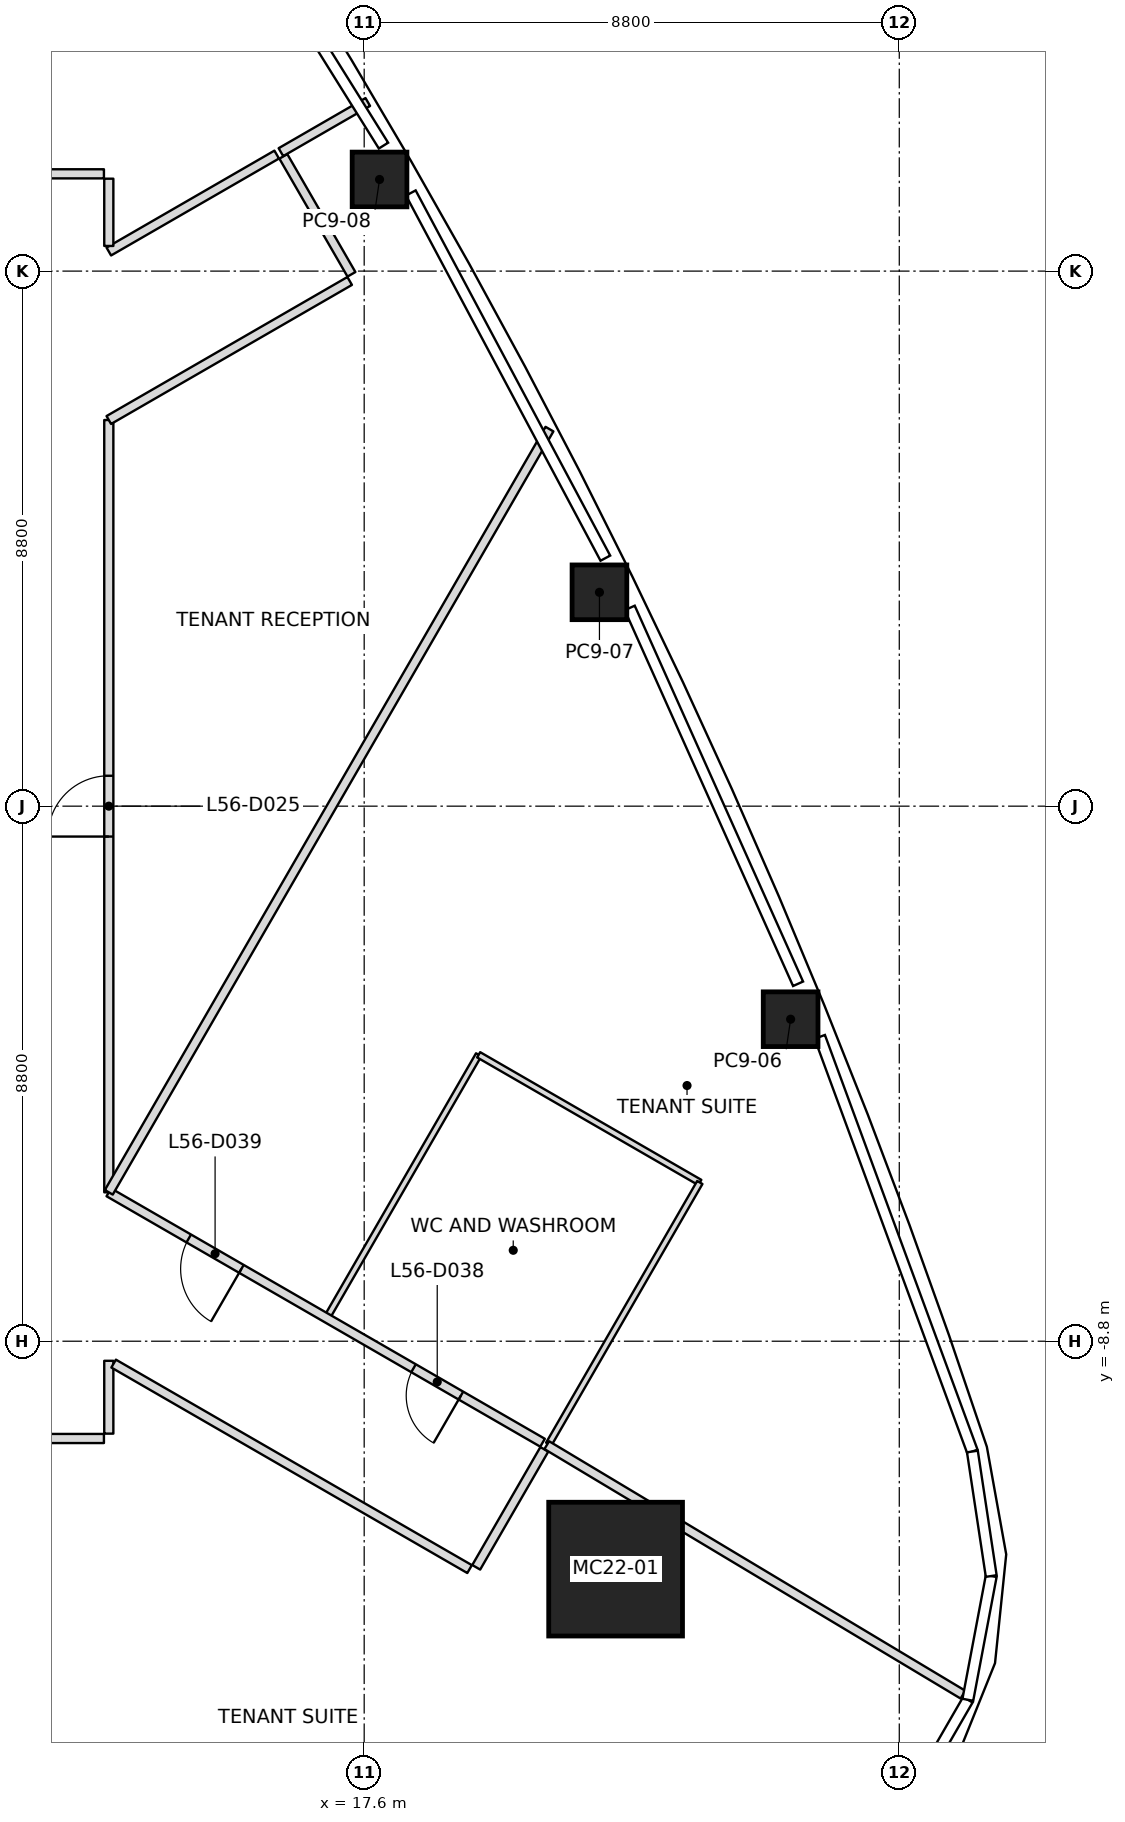
"""IFC4 building model, lengths in metres.
Left out: names, types, materials, properties, quantities, classifications, styles, units other than length and angle.
Written with IfcOpenShell. Run it as: python <this file> out.ifc"""

import sys

from ifc_helpers import new_model, si_unit, direction, frame, frame_2d, origin, origin_2d, place, context, subcontext, project, spatial, rectangle, extrude, element, fill, save


model = new_model("IFC4")
c1 = context("Model", 3, precision=1e-05, world=origin(), true_north=direction((0.0, 1.0)))
c2 = subcontext(c1, "Body", "Model", "MODEL_VIEW")
j1 = project(units=[si_unit("LENGTHUNIT", "METRE"), si_unit("PLANEANGLEUNIT", "RADIAN")], contexts=[c1])
p1 = place(None, origin())
s1 = spatial("IfcSite", under=j1, at=p1, CompositionType="ELEMENT")
p2 = place(p1, origin())
s2 = spatial("IfcBuilding", under=s1, at=p2, CompositionType="ELEMENT")
p3 = place(p2, frame((0.0, 0.0, 251.0)))
s3 = spatial("IfcBuildingStorey", under=s2, at=p3, CompositionType="ELEMENT", Elevation=251.0)
p4 = place(p3, frame((21.735, -12.549, 0.0), z_axis=(-0.027817649629, 0.016104955049, 0.999483270892), x_axis=(0.999613014306, 0.000448175434, 0.027814039075)))
e1 = element("IfcColumn", 1, at=p4, inside=s3, PredefinedType="COLUMN", context=c2, shape_type="SweptSolid", body=[
    extrude(rectangle(XDim=2.2, YDim=2.2, at=origin_2d()), origin(), (0.0, 0.0, 1.0), 4.002),
])
p5 = place(p3, frame((24.613, -3.504, 0.0), z_axis=(-0.017757551143, 0.009946669541, 0.999792845115), x_axis=(-0.377201101393, 0.925994674121, -0.015912027123)))
e2 = element("IfcColumn", 2, at=p5, inside=s3, PredefinedType="COLUMN", context=c2, shape_type="SweptSolid", body=[
    extrude(rectangle(XDim=0.9, YDim=0.9, at=origin_2d()), origin(), (0.0, 0.0, 1.0), 4.001),
])
p6 = place(p3, frame((21.469, 3.517, 0.0), z_axis=(-0.014036674448, 0.002013957638, 0.999899452818), x_axis=(-0.439615277351, 0.898150723159, -0.007980376444)))
e3 = element("IfcColumn", 3, at=p6, inside=s3, PredefinedType="COLUMN", context=c2, shape_type="SweptSolid", body=[
    extrude(rectangle(XDim=0.9, YDim=0.9, at=origin_2d()), origin(), (0.0, 0.0, 1.0), 4.0),
])
p7 = place(p3, frame((17.853, 10.307, 0.0), z_axis=(-0.009887049298, -0.00573692984, 0.999934664812), x_axis=(-0.499975560967, 0.866039512843, 2.5126546e-05)))
e4 = element("IfcColumn", 4, at=p7, inside=s3, PredefinedType="COLUMN", context=c2, shape_type="SweptSolid", body=[
    extrude(rectangle(XDim=0.9, YDim=0.9, at=origin_2d()), origin(), (0.0, 0.0, 1.0), 4.0),
])
p8 = place(p3, frame((20.647, 6.201, 0.0), z_axis=(0.0, 0.0, 1.0), x_axis=(-0.500014063744, -0.866017283926, 0.0)))
e5 = element("IfcWall", 5, at=p8, inside=s3, PredefinedType="PARTITIONING", context=c2, shape_type="SweptSolid", body=[
    extrude(rectangle(XDim=14.494, YDim=0.15, at=frame_2d((7.247, 0.0))), origin(), (0.0, 0.0, 1.0), 3.234),
])
p9 = place(p3, frame((16.231, 10.756, 0.0), z_axis=(0.0, 0.0, 1.0), x_axis=(0.865966208357, 0.500102515474, 0.0)))
e6 = element("IfcWall", 6, at=p9, inside=s3, PredefinedType="PARTITIONING", context=c2, shape_type="SweptSolid", body=[
    extrude(rectangle(XDim=1.65, YDim=0.15, at=frame_2d((0.825, 0.0))), origin(), (0.0, 0.0, 1.0), 3.234),
])
p10 = place(p3, frame((20.603, -10.509, 0.0), z_axis=(0.0, 0.0, 1.0), x_axis=(0.85768451088, -0.514176311976, 0.0)))
e7 = element("IfcWall", 7, at=p10, inside=s3, PredefinedType="PARTITIONING", context=c2, shape_type="SweptSolid", body=[
    extrude(rectangle(XDim=7.981, YDim=0.15, at=frame_2d((3.99, 0.0))), origin(), (0.0, 0.0, 1.0), 3.234),
])
p11 = place(p3, frame((1.2, -10.4, 0.0), z_axis=(0.0, 0.0, 1.0), x_axis=(1.0, 0.0, 0.0)))
e8 = element("IfcWall", 8, at=p11, inside=s3, PredefinedType="PARTITIONING", context=c2, shape_type="SweptSolid", body=[
    extrude(rectangle(XDim=12.12, YDim=0.15, at=frame_2d((6.06, 0.0))), origin(), (0.0, 0.0, 1.0), 3.317),
])
p12 = place(p11, frame((1.65, 0.0, 0.0)))
e9 = element("IfcOpeningElement", 9, at=p12, cuts=e8, PredefinedType="OPENING", context=c2, shape_type="SweptSolid", body=[
    extrude(rectangle(XDim=0.9, YDim=2.1, at=frame_2d((0.45, 1.05))), frame((0.0, 0.075, 0.0), z_axis=(0.0, -1.0, 0.0), x_axis=(1.0, 0.0, 0.0)), (0.0, 0.0, 1.0), 0.15),
])
p13 = place(p11, frame((7.75, 0.0, 0.0)))
e10 = element("IfcOpeningElement", 10, at=p13, cuts=e8, PredefinedType="OPENING", context=c2, shape_type="SweptSolid", body=[
    extrude(rectangle(XDim=1.0, YDim=2.1, at=frame_2d((0.5, 1.05))), frame((0.0, 0.075, 0.0), z_axis=(0.0, -1.0, 0.0), x_axis=(1.0, 0.0, 0.0)), (0.0, 0.0, 1.0), 0.15),
])
p14 = place(p3, frame((13.32, 10.4, 0.0), z_axis=(0.0, 0.0, 1.0), x_axis=(-1.0, 0.0, 0.0)))
e11 = element("IfcWall", 11, at=p14, inside=s3, PredefinedType="PARTITIONING", context=c2, shape_type="SweptSolid", body=[
    extrude(rectangle(XDim=4.12, YDim=0.15, at=frame_2d((2.06, 0.0))), origin(), (0.0, 0.0, 1.0), 3.45),
])
p15 = place(p14, frame((1.52, 0.0, 0.0)))
e12 = element("IfcOpeningElement", 12, at=p15, cuts=e11, PredefinedType="OPENING", context=c2, shape_type="SweptSolid", body=[
    extrude(rectangle(XDim=1.0, YDim=2.1, at=frame_2d((0.5, 1.05))), frame((0.0, 0.075, 0.0), z_axis=(0.0, -1.0, 0.0), x_axis=(1.0, 0.0, 0.0)), (0.0, 0.0, 1.0), 0.15),
])
p16 = place(p3, frame((13.4, -10.32, 0.0), z_axis=(0.0, 0.0, 1.0), x_axis=(0.0, 1.0, 0.0)))
e13 = element("IfcWall", 13, at=p16, inside=s3, PredefinedType="PARTITIONING", context=c2, shape_type="SweptSolid", body=[
    extrude(rectangle(XDim=1.198, YDim=0.15, at=frame_2d((0.599, 0.0))), origin(), (0.0, 0.0, 1.0), 3.233),
])
p17 = place(p3, frame((13.479, -9.168, 0.0), z_axis=(0.0, 0.0, 1.0), x_axis=(0.866036425609, -0.499980909154, 0.0)))
e14 = element("IfcWall", 14, at=p17, inside=s3, PredefinedType="PARTITIONING", context=c2, shape_type="SweptSolid", body=[
    extrude(rectangle(XDim=6.76, YDim=0.15, at=frame_2d((3.38, 0.0))), origin(), (0.0, 0.0, 1.0), 3.233),
])
p18 = place(p3, frame((13.4, -6.351, 0.0), z_axis=(0.0, 0.0, 1.0), x_axis=(0.0, 1.0, 0.0)))
e15 = element("IfcWall", 15, at=p18, inside=s3, PredefinedType="PARTITIONING", context=c2, shape_type="SweptSolid", body=[
    extrude(rectangle(XDim=12.702, YDim=0.15, at=frame_2d((6.351, 0.0))), origin(), (0.0, 0.0, 1.0), 3.317),
])
p19 = place(p18, frame((5.851, 0.0, 0.0)))
e16 = element("IfcOpeningElement", 16, at=p19, cuts=e15, PredefinedType="OPENING", context=c2, shape_type="SweptSolid", body=[
    extrude(rectangle(XDim=1.0, YDim=2.1, at=frame_2d((0.5, 1.05))), frame((0.0, 0.075, 0.0), z_axis=(0.0, -1.0, 0.0), x_axis=(1.0, 0.0, 0.0)), (0.0, 0.0, 1.0), 0.15),
])
p20 = place(p3, frame((13.4, 6.351, 0.0), z_axis=(0.0, 0.0, 1.0), x_axis=(0.866027379035, 0.49999657875, 0.0)))
e17 = element("IfcWall", 17, at=p20, inside=s3, PredefinedType="PARTITIONING", context=c2, shape_type="SweptSolid", body=[
    extrude(rectangle(XDim=4.574, YDim=0.15, at=frame_2d((2.287, 0.0))), origin(), (0.0, 0.0, 1.0), 3.45),
])
p21 = place(p3, frame((20.533, -10.469, 0.0), z_axis=(0.0, 0.0, 1.0), x_axis=(-0.866025662596, 0.499999551726, 0.0)))
e18 = element("IfcWall", 18, at=p21, inside=s3, PredefinedType="PARTITIONING", context=c2, shape_type="SweptSolid", body=[
    extrude(rectangle(XDim=8.237, YDim=0.15, at=frame_2d((4.118, 0.0))), origin(), (0.0, 0.0, 1.0), 3.317),
])
p22 = place(p21, frame((1.55, 0.0, 0.0)))
e19 = element("IfcOpeningElement", 19, at=p22, cuts=e18, PredefinedType="OPENING", context=c2, shape_type="SweptSolid", body=[
    extrude(rectangle(XDim=0.9, YDim=2.1, at=frame_2d((0.45, 1.05))), frame((0.0, 0.075, 0.0), z_axis=(0.0, -1.0, 0.0), x_axis=(1.0, 0.0, 0.0)), (0.0, 0.0, 1.0), 0.15),
])
p23 = place(p21, frame((5.719, 0.0, 0.0)))
e20 = element("IfcOpeningElement", 20, at=p23, cuts=e18, PredefinedType="OPENING", context=c2, shape_type="SweptSolid", body=[
    extrude(rectangle(XDim=1.0, YDim=2.1, at=frame_2d((0.5, 1.05))), frame((0.0, 0.075, 0.0), z_axis=(0.0, -1.0, 0.0), x_axis=(1.0, 0.0, 0.0)), (0.0, 0.0, 1.0), 0.15),
])
p24 = place(p3, frame((16.161, 10.716, 0.0), z_axis=(0.0, 0.0, 1.0), x_axis=(-0.86603896, -0.499976519211, 0.0)))
e21 = element("IfcWall", 21, at=p24, inside=s3, PredefinedType="PARTITIONING", context=c2, shape_type="SweptSolid", body=[
    extrude(rectangle(XDim=3.189, YDim=0.15, at=frame_2d((1.594, 0.0))), origin(), (0.0, 0.0, 1.0), 3.45),
])
p25 = place(p3, frame((13.4, 9.214, 0.0), z_axis=(0.0, 0.0, 1.0), x_axis=(0.0, 1.0, 0.0)))
e22 = element("IfcWall", 22, at=p25, inside=s3, PredefinedType="PARTITIONING", context=c2, shape_type="SweptSolid", body=[
    extrude(rectangle(XDim=1.106, YDim=0.15, at=frame_2d((0.553, 0.0))), origin(), (0.0, 0.0, 1.0), 3.45),
])
p26 = place(p3, frame((17.391, 8.747, 0.0), z_axis=(0.0, 0.0, 1.0), x_axis=(-0.500077830873, 0.865980463445, 0.0)))
e23 = element("IfcWall", 23, at=p26, inside=s3, PredefinedType="PARTITIONING", context=c2, shape_type="SweptSolid", body=[
    extrude(rectangle(XDim=2.24, YDim=0.15, at=frame_2d((1.12, 0.0))), origin(), (0.0, 0.0, 1.0), 3.45),
])
p27 = place(p3, frame((19.443, -12.519, 0.0), z_axis=(0.0, 0.0, 1.0), x_axis=(0.49994888933, 0.866054910533, 0.0)))
e24 = element("IfcWall", 24, at=p27, inside=s3, PredefinedType="PARTITIONING", context=c2, shape_type="SweptSolid", body=[
    extrude(rectangle(XDim=2.24, YDim=0.15, at=frame_2d((1.12, 0.0))), origin(), (0.0, 0.0, 1.0), 3.233),
])
p28 = place(p3, frame((16.998, -8.393, 0.0), z_axis=(0.0, 0.0, 1.0), x_axis=(0.500011595943, 0.86601870876, 0.0)))
e25 = element("IfcWall", 25, at=p28, inside=s3, PredefinedType="PARTITIONING", context=c2, shape_type="SweptSolid", body=[
    extrude(rectangle(XDim=4.97, YDim=0.1, at=frame_2d((2.485, 0.0))), origin(), (0.0, 0.0, 1.0), 3.317),
])
p29 = place(p3, frame((19.483, -4.089, 0.0), z_axis=(0.0, 0.0, 1.0), x_axis=(0.866009402589, -0.500027713859, 0.0)))
e26 = element("IfcWall", 26, at=p29, inside=s3, PredefinedType="PARTITIONING", context=c2, shape_type="SweptSolid", body=[
    extrude(rectangle(XDim=4.2, YDim=0.1, at=frame_2d((2.1, 0.0))), origin(), (0.0, 0.0, 1.0), 3.317),
])
p30 = place(p3, frame((23.12, -6.189, 0.0), z_axis=(0.0, 0.0, 1.0), x_axis=(-0.499974753747, -0.866039979225, 0.0)))
e27 = element("IfcWall", 27, at=p30, inside=s3, PredefinedType="PARTITIONING", context=c2, shape_type="SweptSolid", body=[
    extrude(rectangle(XDim=4.97, YDim=0.1, at=frame_2d((2.485, 0.0))), origin(), (0.0, 0.0, 1.0), 3.443),
])
p31 = place(p19, origin())
e28 = element("IfcDoor", 28, at=p31, inside=s3, OperationType="SINGLE_SWING_RIGHT", PredefinedType="DOOR", context=c2, shape_type="SweptSolid", body=[
    extrude(rectangle(XDim=1.0, YDim=2.1, at=frame_2d((0.5, 1.05))), frame((0.0, 0.025, 0.0), z_axis=(0.0, -1.0, 0.0), x_axis=(1.0, 0.0, 0.0)), (0.0, 0.0, 1.0), 0.05),
])
fill(e16, e28)
p32 = place(p22, origin())
e29 = element("IfcDoor", 29, at=p32, inside=s3, OperationType="SINGLE_SWING_LEFT", PredefinedType="DOOR", context=c2, shape_type="SweptSolid", body=[
    extrude(rectangle(XDim=0.9, YDim=2.1, at=frame_2d((0.45, 1.05))), frame((0.0, 0.025, 0.0), z_axis=(0.0, -1.0, 0.0), x_axis=(1.0, 0.0, 0.0)), (0.0, 0.0, 1.0), 0.05),
])
fill(e19, e29)
p33 = place(p23, origin())
e30 = element("IfcDoor", 30, at=p33, inside=s3, OperationType="SINGLE_SWING_LEFT", PredefinedType="DOOR", context=c2, shape_type="SweptSolid", body=[
    extrude(rectangle(XDim=1.0, YDim=2.1, at=frame_2d((0.5, 1.05))), frame((0.0, 0.025, 0.0), z_axis=(0.0, -1.0, 0.0), x_axis=(1.0, 0.0, 0.0)), (0.0, 0.0, 1.0), 0.05),
])
fill(e20, e30)
save(model, sys.argv[1])
